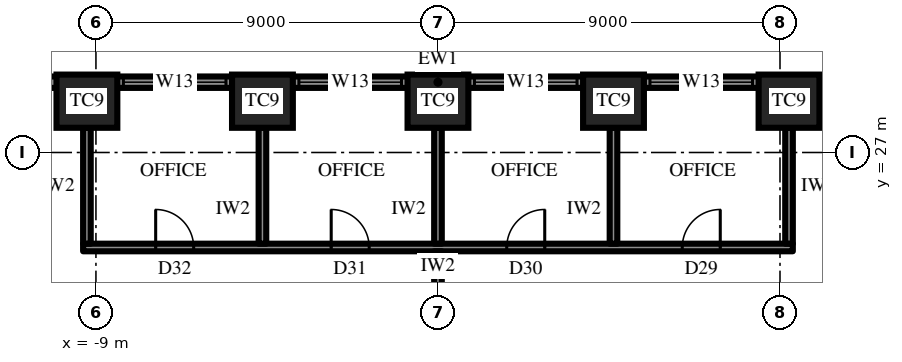
"""IFC4 building model, lengths in metres.
Left out: names, types, materials, properties, quantities, classifications, styles, units other than length and angle.
Written with IfcOpenShell. Run it as: python <this file> out.ifc"""

import sys

from ifc_helpers import new_model, si_unit, direction, frame, frame_2d, origin, origin_2d, place, context, subcontext, project, spatial, rectangle, extrude, element, fill, save


model = new_model("IFC4")
c1 = context("Model", 3, precision=1e-05, world=origin(), true_north=direction((0.0, 1.0)))
c2 = subcontext(c1, "Body", "Model", "MODEL_VIEW")
j1 = project(units=[si_unit("LENGTHUNIT", "METRE"), si_unit("PLANEANGLEUNIT", "RADIAN")], contexts=[c1])
p1 = place(None, origin())
s1 = spatial("IfcSite", under=j1, at=p1, CompositionType="ELEMENT")
p2 = place(p1, origin())
s2 = spatial("IfcBuilding", under=s1, at=p2, CompositionType="ELEMENT")
p3 = place(p2, frame((0.0, 0.0, 228.1)))
s3 = spatial("IfcBuildingStorey", under=s2, at=p3, CompositionType="ELEMENT", Elevation=228.1)
for number, where, z_axis, x_axis in (
    (1, (9.238, 28.35, 0.0), (0.0, 0.0, 1.0), (-1.0, 0.0, 0.0)),
    (2, (4.619, 28.35, 0.0), (0.0, 0.0, 1.0), (-1.0, 0.0, 0.0)),
    (3, (0.0, 28.35, 0.0), (0.0, 0.0, 1.0), (-1.0, 0.0, 0.0)),
    (4, (-4.619, 28.35, 0.0), (0.0, 0.0, 1.0), (-1.0, 0.0, 0.0)),
    (5, (-9.238, 28.35, 0.0), (0.0, 0.0, 1.0), (-1.0, 0.0, 0.0)),
):
    element("IfcColumn", number, at=place(p3, frame(where, z_axis=z_axis, x_axis=x_axis)), inside=s3, PredefinedType="COLUMN", context=c2, shape_type="SweptSolid", body=[
        extrude(rectangle(XDim=1.6, YDim=1.4, at=origin_2d()), origin(), (0.0, 0.0, 1.0), 4.2),
    ])
p4 = place(p3, frame((13.856, 28.85, 0.0), z_axis=(0.0, 0.0, 1.0), x_axis=(-1.0, 0.0, 0.0)))
e6 = element("IfcWall", 6, at=p4, inside=s3, PredefinedType="SOLIDWALL", context=c2, shape_type="SweptSolid", body=[
    extrude(rectangle(XDim=27.713, YDim=0.3, at=frame_2d((13.856, 0.0))), origin(), (0.0, 0.0, 1.0), 2.0),
])
p5 = place(p4, frame((0.959, 0.0, 0.6)))
e7 = element("IfcOpeningElement", 7, at=p5, cuts=e6, PredefinedType="OPENING", context=c2, shape_type="SweptSolid", body=[
    extrude(rectangle(XDim=2.7, YDim=1.15, at=frame_2d((1.35, 0.575))), frame((0.0, 0.16, 0.0), z_axis=(0.0, -1.0, 0.0), x_axis=(1.0, 0.0, 0.0)), (0.0, 0.0, 1.0), 0.32),
])
p6 = place(p4, frame((5.578, 0.0, 0.6)))
e8 = element("IfcOpeningElement", 8, at=p6, cuts=e6, PredefinedType="OPENING", context=c2, shape_type="SweptSolid", body=[
    extrude(rectangle(XDim=2.7, YDim=1.15, at=frame_2d((1.35, 0.575))), frame((0.0, 0.16, 0.0), z_axis=(0.0, -1.0, 0.0), x_axis=(1.0, 0.0, 0.0)), (0.0, 0.0, 1.0), 0.32),
])
p7 = place(p4, frame((10.197, 0.0, 0.6)))
e9 = element("IfcOpeningElement", 9, at=p7, cuts=e6, PredefinedType="OPENING", context=c2, shape_type="SweptSolid", body=[
    extrude(rectangle(XDim=2.7, YDim=1.15, at=frame_2d((1.35, 0.575))), frame((0.0, 0.16, 0.0), z_axis=(0.0, -1.0, 0.0), x_axis=(1.0, 0.0, 0.0)), (0.0, 0.0, 1.0), 0.32),
])
p8 = place(p4, frame((14.816, 0.0, 0.6)))
e10 = element("IfcOpeningElement", 10, at=p8, cuts=e6, PredefinedType="OPENING", context=c2, shape_type="SweptSolid", body=[
    extrude(rectangle(XDim=2.7, YDim=1.15, at=frame_2d((1.35, 0.575))), frame((0.0, 0.16, 0.0), z_axis=(0.0, -1.0, 0.0), x_axis=(1.0, 0.0, 0.0)), (0.0, 0.0, 1.0), 0.32),
])
p9 = place(p4, frame((19.435, 0.0, 0.6)))
e11 = element("IfcOpeningElement", 11, at=p9, cuts=e6, PredefinedType="OPENING", context=c2, shape_type="SweptSolid", body=[
    extrude(rectangle(XDim=2.7, YDim=1.15, at=frame_2d((1.35, 0.575))), frame((0.0, 0.16, 0.0), z_axis=(0.0, -1.0, 0.0), x_axis=(1.0, 0.0, 0.0)), (0.0, 0.0, 1.0), 0.32),
])
p10 = place(p4, frame((24.053, 0.0, 0.6)))
e12 = element("IfcOpeningElement", 12, at=p10, cuts=e6, PredefinedType="OPENING", context=c2, shape_type="SweptSolid", body=[
    extrude(rectangle(XDim=2.7, YDim=1.15, at=frame_2d((1.35, 0.575))), frame((0.0, 0.16, 0.0), z_axis=(0.0, -1.0, 0.0), x_axis=(1.0, 0.0, 0.0)), (0.0, 0.0, 1.0), 0.32),
])
p11 = place(p3, frame((9.338, 24.5, 0.0), z_axis=(0.0, 0.0, 1.0), x_axis=(-1.0, 0.0, 0.0)))
e13 = element("IfcWall", 13, at=p11, inside=s3, PredefinedType="PARTITIONING", context=c2, shape_type="SweptSolid", body=[
    extrude(rectangle(XDim=18.675, YDim=0.2, at=frame_2d((9.338, 0.0))), origin(), (0.0, 0.0, 1.0), 4.0),
])
p12 = place(p11, frame((1.909, 0.0, 0.0)))
e14 = element("IfcOpeningElement", 14, at=p12, cuts=e13, PredefinedType="OPENING", context=c2, shape_type="SweptSolid", body=[
    extrude(rectangle(XDim=1.0, YDim=2.2, at=frame_2d((0.5, 1.1))), frame((0.0, 0.11, 0.0), z_axis=(0.0, -1.0, 0.0), x_axis=(1.0, 0.0, 0.0)), (0.0, 0.0, 1.0), 0.22),
])
p13 = place(p11, frame((6.528, 0.0, 0.0)))
e15 = element("IfcOpeningElement", 15, at=p13, cuts=e13, PredefinedType="OPENING", context=c2, shape_type="SweptSolid", body=[
    extrude(rectangle(XDim=1.0, YDim=2.2, at=frame_2d((0.5, 1.1))), frame((0.0, 0.11, 0.0), z_axis=(0.0, -1.0, 0.0), x_axis=(1.0, 0.0, 0.0)), (0.0, 0.0, 1.0), 0.22),
])
p14 = place(p11, frame((11.147, 0.0, 0.0)))
e16 = element("IfcOpeningElement", 16, at=p14, cuts=e13, PredefinedType="OPENING", context=c2, shape_type="SweptSolid", body=[
    extrude(rectangle(XDim=1.0, YDim=2.2, at=frame_2d((0.5, 1.1))), frame((0.0, 0.11, 0.0), z_axis=(0.0, -1.0, 0.0), x_axis=(1.0, 0.0, 0.0)), (0.0, 0.0, 1.0), 0.22),
])
p15 = place(p11, frame((15.766, 0.0, 0.0)))
e17 = element("IfcOpeningElement", 17, at=p15, cuts=e13, PredefinedType="OPENING", context=c2, shape_type="SweptSolid", body=[
    extrude(rectangle(XDim=1.0, YDim=2.2, at=frame_2d((0.5, 1.1))), frame((0.0, 0.11, 0.0), z_axis=(0.0, -1.0, 0.0), x_axis=(1.0, 0.0, 0.0)), (0.0, 0.0, 1.0), 0.22),
])
for number, where, z_axis, x_axis in (
    (18, (9.238, 24.6, 0.0), (0.0, 0.0, 1.0), (0.0, 1.0, 0.0)),
    (19, (4.619, 24.6, 0.0), (0.0, 0.0, 1.0), (0.0, 1.0, 0.0)),
    (20, (0.0, 24.6, 0.0), (0.0, 0.0, 1.0), (0.0, 1.0, 0.0)),
    (21, (-4.619, 24.6, 0.0), (0.0, 0.0, 1.0), (0.0, 1.0, 0.0)),
    (22, (-9.238, 24.6, 0.0), (0.0, 0.0, 1.0), (0.0, 1.0, 0.0)),
):
    element("IfcWall", number, at=place(p3, frame(where, z_axis=z_axis, x_axis=x_axis)), inside=s3, PredefinedType="PARTITIONING", context=c2, shape_type="SweptSolid", body=[
        extrude(rectangle(XDim=3.05, YDim=0.2, at=frame_2d((1.525, 0.0))), origin(), (0.0, 0.0, 1.0), 2.992),
    ])
p16 = place(p3, frame((0.0, 19.2, 0.0), z_axis=(0.0, 0.0, 1.0), x_axis=(0.0, 1.0, 0.0)))
e23 = element("IfcWall", 23, at=p16, inside=s3, PredefinedType="PARTITIONING", context=c2, shape_type="SweptSolid", body=[
    extrude(rectangle(XDim=5.2, YDim=0.2, at=frame_2d((2.6, 0.0))), origin(), (0.0, 0.0, 1.0), 2.992),
])
p17 = place(p6, origin())
e24 = element("IfcWindow", 24, at=p17, inside=s3, PartitioningType="SINGLE_PANEL", PredefinedType="WINDOW", context=c2, shape_type="SweptSolid", body=[
    extrude(rectangle(XDim=2.7, YDim=1.15, at=frame_2d((1.35, 0.575))), frame((0.0, 0.03, 0.0), z_axis=(0.0, -1.0, 0.0), x_axis=(1.0, 0.0, 0.0)), (0.0, 0.0, 1.0), 0.06),
])
fill(e8, e24)
p18 = place(p7, origin())
e25 = element("IfcWindow", 25, at=p18, inside=s3, PartitioningType="SINGLE_PANEL", PredefinedType="WINDOW", context=c2, shape_type="SweptSolid", body=[
    extrude(rectangle(XDim=2.7, YDim=1.15, at=frame_2d((1.35, 0.575))), frame((0.0, 0.03, 0.0), z_axis=(0.0, -1.0, 0.0), x_axis=(1.0, 0.0, 0.0)), (0.0, 0.0, 1.0), 0.06),
])
fill(e9, e25)
p19 = place(p8, origin())
e26 = element("IfcWindow", 26, at=p19, inside=s3, PartitioningType="SINGLE_PANEL", PredefinedType="WINDOW", context=c2, shape_type="SweptSolid", body=[
    extrude(rectangle(XDim=2.7, YDim=1.15, at=frame_2d((1.35, 0.575))), frame((0.0, 0.03, 0.0), z_axis=(0.0, -1.0, 0.0), x_axis=(1.0, 0.0, 0.0)), (0.0, 0.0, 1.0), 0.06),
])
fill(e10, e26)
p20 = place(p9, origin())
e27 = element("IfcWindow", 27, at=p20, inside=s3, PartitioningType="SINGLE_PANEL", PredefinedType="WINDOW", context=c2, shape_type="SweptSolid", body=[
    extrude(rectangle(XDim=2.7, YDim=1.15, at=frame_2d((1.35, 0.575))), frame((0.0, 0.03, 0.0), z_axis=(0.0, -1.0, 0.0), x_axis=(1.0, 0.0, 0.0)), (0.0, 0.0, 1.0), 0.06),
])
fill(e11, e27)
p21 = place(p12, frame((1.0, 0.0, 0.0), z_axis=(0.0, 0.0, 1.0), x_axis=(-1.0, 0.0, 0.0)))
e28 = element("IfcDoor", 28, at=p21, inside=s3, OperationType="SINGLE_SWING_LEFT", PredefinedType="DOOR", context=c2, shape_type="SweptSolid", body=[
    extrude(rectangle(XDim=1.0, YDim=2.2, at=frame_2d((0.5, 1.1))), frame((0.0, 0.025, 0.0), z_axis=(0.0, -1.0, 0.0), x_axis=(1.0, 0.0, 0.0)), (0.0, 0.0, 1.0), 0.05),
])
fill(e14, e28)
p22 = place(p13, frame((1.0, 0.0, 0.0), z_axis=(0.0, 0.0, 1.0), x_axis=(-1.0, 0.0, 0.0)))
e29 = element("IfcDoor", 29, at=p22, inside=s3, OperationType="SINGLE_SWING_LEFT", PredefinedType="DOOR", context=c2, shape_type="SweptSolid", body=[
    extrude(rectangle(XDim=1.0, YDim=2.2, at=frame_2d((0.5, 1.1))), frame((0.0, 0.025, 0.0), z_axis=(0.0, -1.0, 0.0), x_axis=(1.0, 0.0, 0.0)), (0.0, 0.0, 1.0), 0.05),
])
fill(e15, e29)
p23 = place(p14, frame((1.0, 0.0, 0.0), z_axis=(0.0, 0.0, 1.0), x_axis=(-1.0, 0.0, 0.0)))
e30 = element("IfcDoor", 30, at=p23, inside=s3, OperationType="SINGLE_SWING_RIGHT", PredefinedType="DOOR", context=c2, shape_type="SweptSolid", body=[
    extrude(rectangle(XDim=1.0, YDim=2.2, at=frame_2d((0.5, 1.1))), frame((0.0, 0.025, 0.0), z_axis=(0.0, -1.0, 0.0), x_axis=(1.0, 0.0, 0.0)), (0.0, 0.0, 1.0), 0.05),
])
fill(e16, e30)
p24 = place(p15, frame((1.0, 0.0, 0.0), z_axis=(0.0, 0.0, 1.0), x_axis=(-1.0, 0.0, 0.0)))
e31 = element("IfcDoor", 31, at=p24, inside=s3, OperationType="SINGLE_SWING_RIGHT", PredefinedType="DOOR", context=c2, shape_type="SweptSolid", body=[
    extrude(rectangle(XDim=1.0, YDim=2.2, at=frame_2d((0.5, 1.1))), frame((0.0, 0.025, 0.0), z_axis=(0.0, -1.0, 0.0), x_axis=(1.0, 0.0, 0.0)), (0.0, 0.0, 1.0), 0.05),
])
fill(e17, e31)
save(model, sys.argv[1])
